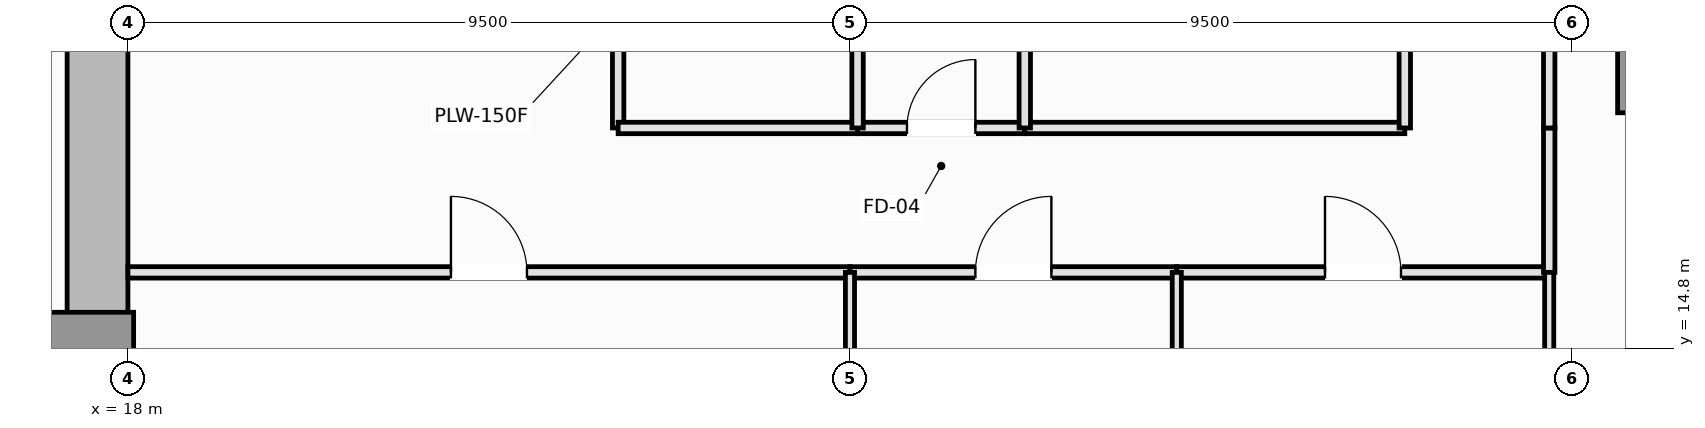
"""IFC4 building model, lengths in metres.
Left out: names, types, materials, properties, quantities, classifications, styles, units other than length and angle.
Written with IfcOpenShell. Run it as: python <this file> out.ifc"""

import sys

from ifc_helpers import new_model, si_unit, direction, frame, frame_2d, origin, origin_2d, place, context, subcontext, project, spatial, rectangle, extrude, element, fill, save


model = new_model("IFC4")
c1 = context("Model", 3, precision=1e-05, world=origin(), true_north=direction((0.0, 1.0)))
c2 = subcontext(c1, "Body", "Model", "MODEL_VIEW")
j1 = project(units=[si_unit("LENGTHUNIT", "METRE"), si_unit("PLANEANGLEUNIT", "RADIAN")], contexts=[c1])
p1 = place(None, origin())
s1 = spatial("IfcSite", under=j1, at=p1, CompositionType="ELEMENT")
p2 = place(p1, origin())
s2 = spatial("IfcBuilding", under=s1, at=p2, CompositionType="ELEMENT")
p3 = place(p2, frame((0.0, 0.0, 75.3)))
s3 = spatial("IfcBuildingStorey", under=s2, at=p3, CompositionType="ELEMENT", Elevation=75.3)
p4 = place(p3, frame((17.6, 14.8, 0.0), z_axis=(0.0, 0.0, 1.0), x_axis=(0.0, 1.0, 0.0)))
e1 = element("IfcWall", 1, at=p4, inside=s3, PredefinedType="SHEAR", context=c2, shape_type="SweptSolid", body=[
    extrude(rectangle(XDim=8.65, YDim=0.8, at=frame_2d((4.325, 0.0))), origin(), (0.0, 0.0, 1.0), 3.55),
])
p5 = place(p4, frame((4.1, 0.0, 0.0)))
e2 = element("IfcOpeningElement", 2, at=p5, cuts=e1, PredefinedType="OPENING", context=c2, shape_type="SweptSolid", body=[
    extrude(rectangle(XDim=1.1, YDim=2.15, at=frame_2d((0.55, 1.075))), frame((0.0, 0.41, 0.0), z_axis=(0.0, -1.0, 0.0), x_axis=(1.0, 0.0, 0.0)), (0.0, 0.0, 1.0), 0.82),
])
p6 = place(p3, frame((17.4, 14.6, 0.0), z_axis=(0.0, 0.0, 1.0), x_axis=(1.0, 0.0, 0.0)))
e3 = element("IfcColumn", 3, at=p6, inside=s3, PredefinedType="PILASTER", context=c2, shape_type="SweptSolid", body=[
    extrude(rectangle(XDim=1.35, YDim=1.35, at=origin_2d()), origin(), (0.0, 0.0, 1.0), 3.55),
])
p7 = place(p3, frame((38.2, 18.5, 0.0), z_axis=(0.0, 0.0, 1.0), x_axis=(1.0, 0.0, 0.0)))
e4 = element("IfcColumn", 4, at=p7, inside=s3, PredefinedType="COLUMN", context=c2, shape_type="SweptSolid", body=[
    extrude(rectangle(XDim=1.2, YDim=1.2, at=origin_2d()), origin(), (0.0, 0.0, 1.0), 3.55),
])
p8 = place(p3, frame((24.45, 17.7, 0.0), z_axis=(0.0, 0.0, 1.0), x_axis=(0.0, 1.0, 0.0)))
e5 = element("IfcWall", 5, at=p8, inside=s3, PredefinedType="PLUMBINGWALL", context=c2, shape_type="SweptSolid", body=[
    extrude(rectangle(XDim=3.1, YDim=0.15, at=frame_2d((1.55, 0.0))), origin(), (0.0, 0.0, 1.0), 3.37),
])
p9 = place(p8, frame((1.1, 0.0, 0.0)))
e6 = element("IfcOpeningElement", 6, at=p9, cuts=e5, PredefinedType="OPENING", context=c2, shape_type="SweptSolid", body=[
    extrude(rectangle(XDim=0.9, YDim=2.1, at=frame_2d((0.45, 1.05))), frame((0.0, 0.085, 0.0), z_axis=(0.0, -1.0, 0.0), x_axis=(1.0, 0.0, 0.0)), (0.0, 0.0, 1.0), 0.17),
])
p10 = place(p3, frame((24.45, 17.7, 0.0), z_axis=(0.0, 0.0, 1.0), x_axis=(1.0, 0.0, 0.0)))
e7 = element("IfcWall", 7, at=p10, inside=s3, PredefinedType="PLUMBINGWALL", context=c2, shape_type="SweptSolid", body=[
    extrude(rectangle(XDim=3.15, YDim=0.15, at=frame_2d((1.575, 0.0))), origin(), (0.0, 0.0, 1.0), 3.37),
])
p11 = place(p3, frame((27.6, 17.7, 0.0), z_axis=(0.0, 0.0, 1.0), x_axis=(1.0, 0.0, 0.0)))
e8 = element("IfcWall", 8, at=p11, inside=s3, PredefinedType="PLUMBINGWALL", context=c2, shape_type="SweptSolid", body=[
    extrude(rectangle(XDim=2.2, YDim=0.15, at=frame_2d((1.1, 0.0))), origin(), (0.0, 0.0, 1.0), 3.37),
])
p12 = place(p11, frame((0.65, 0.0, 0.0)))
e9 = element("IfcOpeningElement", 9, at=p12, cuts=e8, PredefinedType="OPENING", context=c2, shape_type="SweptSolid", body=[
    extrude(rectangle(XDim=0.9, YDim=2.1, at=frame_2d((0.45, 1.05))), frame((0.0, 0.085, 0.0), z_axis=(0.0, -1.0, 0.0), x_axis=(1.0, 0.0, 0.0)), (0.0, 0.0, 1.0), 0.17),
])
p13 = place(p3, frame((29.8, 17.7, 0.0), z_axis=(0.0, 0.0, 1.0), x_axis=(1.0, 0.0, 0.0)))
e10 = element("IfcWall", 10, at=p13, inside=s3, PredefinedType="PARTITIONING", context=c2, shape_type="SweptSolid", body=[
    extrude(rectangle(XDim=5.0, YDim=0.15, at=frame_2d((2.5, 0.0))), origin(), (0.0, 0.0, 1.0), 3.37),
])
p14 = place(p3, frame((18.0, 15.8, 0.0), z_axis=(0.0, 0.0, 1.0), x_axis=(1.0, 0.0, 0.0)))
e11 = element("IfcWall", 11, at=p14, inside=s3, PredefinedType="PARTITIONING", context=c2, shape_type="SweptSolid", body=[
    extrude(rectangle(XDim=9.5, YDim=0.15, at=frame_2d((4.75, 0.0))), origin(), (0.0, 0.0, 1.0), 3.37),
])
p15 = place(p14, frame((4.25, 0.0, 0.0)))
e12 = element("IfcOpeningElement", 12, at=p15, cuts=e11, PredefinedType="OPENING", context=c2, shape_type="SweptSolid", body=[
    extrude(rectangle(XDim=1.0, YDim=2.15, at=frame_2d((0.5, 1.075))), frame((0.0, 0.085, 0.0), z_axis=(0.0, -1.0, 0.0), x_axis=(1.0, 0.0, 0.0)), (0.0, 0.0, 1.0), 0.17),
])
p16 = place(p3, frame((27.5, 15.8, 0.0), z_axis=(0.0, 0.0, 1.0), x_axis=(1.0, 0.0, 0.0)))
e13 = element("IfcWall", 13, at=p16, inside=s3, PredefinedType="PARTITIONING", context=c2, shape_type="SweptSolid", body=[
    extrude(rectangle(XDim=4.3, YDim=0.15, at=frame_2d((2.15, 0.0))), origin(), (0.0, 0.0, 1.0), 3.37),
])
p17 = place(p16, frame((1.65, 0.0, 0.0)))
e14 = element("IfcOpeningElement", 14, at=p17, cuts=e13, PredefinedType="OPENING", context=c2, shape_type="SweptSolid", body=[
    extrude(rectangle(XDim=1.0, YDim=2.15, at=frame_2d((0.5, 1.075))), frame((0.0, 0.085, 0.0), z_axis=(0.0, -1.0, 0.0), x_axis=(1.0, 0.0, 0.0)), (0.0, 0.0, 1.0), 0.17),
])
p18 = place(p3, frame((31.8, 15.8, 0.0), z_axis=(0.0, 0.0, 1.0), x_axis=(1.0, 0.0, 0.0)))
e15 = element("IfcWall", 15, at=p18, inside=s3, PredefinedType="PARTITIONING", context=c2, shape_type="SweptSolid", body=[
    extrude(rectangle(XDim=4.9, YDim=0.15, at=frame_2d((2.45, 0.0))), origin(), (0.0, 0.0, 1.0), 3.37),
])
p19 = place(p18, frame((1.95, 0.0, 0.0)))
e16 = element("IfcOpeningElement", 16, at=p19, cuts=e15, PredefinedType="OPENING", context=c2, shape_type="SweptSolid", body=[
    extrude(rectangle(XDim=1.0, YDim=2.15, at=frame_2d((0.5, 1.075))), frame((0.0, 0.085, 0.0), z_axis=(0.0, -1.0, 0.0), x_axis=(1.0, 0.0, 0.0)), (0.0, 0.0, 1.0), 0.17),
])
p20 = place(p3, frame((36.7, 15.8, 0.0), z_axis=(0.0, 0.0, 1.0), x_axis=(0.0, 1.0, 0.0)))
e17 = element("IfcWall", 17, at=p20, inside=s3, PredefinedType="PARTITIONING", context=c2, shape_type="SweptSolid", body=[
    extrude(rectangle(XDim=1.9, YDim=0.15, at=frame_2d((0.95, 0.0))), origin(), (0.0, 0.0, 1.0), 3.37),
])
p21 = place(p3, frame((34.8, 17.7, 0.0), z_axis=(0.0, 0.0, 1.0), x_axis=(0.0, 1.0, 0.0)))
e18 = element("IfcWall", 18, at=p21, inside=s3, PredefinedType="PARTITIONING", context=c2, shape_type="SweptSolid", body=[
    extrude(rectangle(XDim=3.1, YDim=0.15, at=frame_2d((1.55, 0.0))), origin(), (0.0, 0.0, 1.0), 3.37),
])
p22 = place(p21, frame((1.05, 0.0, 0.0)))
e19 = element("IfcOpeningElement", 19, at=p22, cuts=e18, PredefinedType="OPENING", context=c2, shape_type="SweptSolid", body=[
    extrude(rectangle(XDim=1.0, YDim=2.15, at=frame_2d((0.5, 1.075))), frame((0.0, 0.085, 0.0), z_axis=(0.0, -1.0, 0.0), x_axis=(1.0, 0.0, 0.0)), (0.0, 0.0, 1.0), 0.17),
])
p23 = place(p3, frame((36.7, 17.7, 0.0), z_axis=(0.0, 0.0, 1.0), x_axis=(0.0, 1.0, 0.0)))
e20 = element("IfcWall", 20, at=p23, inside=s3, PredefinedType="PARTITIONING", context=c2, shape_type="SweptSolid", body=[
    extrude(rectangle(XDim=14.3, YDim=0.15, at=frame_2d((7.15, 0.0))), origin(), (0.0, 0.0, 1.0), 3.37),
])
p24 = place(p23, frame((5.683, 0.0, 0.0)))
e21 = element("IfcOpeningElement", 21, at=p24, cuts=e20, PredefinedType="OPENING", context=c2, shape_type="SweptSolid", body=[
    extrude(rectangle(XDim=1.0, YDim=2.15, at=frame_2d((0.5, 1.075))), frame((0.0, 0.085, 0.0), z_axis=(0.0, -1.0, 0.0), x_axis=(1.0, 0.0, 0.0)), (0.0, 0.0, 1.0), 0.17),
])
for number, where, z_axis, x_axis in (
    (22, (27.6, 17.7, 0.0), (0.0, 0.0, 1.0), (0.0, 1.0, 0.0)),
    (23, (29.8, 17.7, 0.0), (0.0, 0.0, 1.0), (0.0, 1.0, 0.0)),
):
    element("IfcWall", number, at=place(p3, frame(where, z_axis=z_axis, x_axis=x_axis)), inside=s3, PredefinedType="PLUMBINGWALL", context=c2, shape_type="SweptSolid", body=[
        extrude(rectangle(XDim=3.1, YDim=0.15, at=frame_2d((1.55, 0.0))), origin(), (0.0, 0.0, 1.0), 3.37),
    ])
p25 = place(p3, frame((27.5, 2.51, 0.0), z_axis=(0.0, 0.0, 1.0), x_axis=(0.0, 1.0, 0.0)))
e24 = element("IfcWall", 24, at=p25, inside=s3, PredefinedType="PARTITIONING", context=c2, shape_type="SweptSolid", body=[
    extrude(rectangle(XDim=13.29, YDim=0.12, at=frame_2d((6.645, 0.0))), origin(), (0.0, 0.0, 1.0), 2.82),
])
for number, where, z_axis, x_axis in (
    (25, (31.8, 2.51, 0.0), (0.0, 0.0, 1.0), (0.0, 1.0, 0.0)),
    (26, (36.7, 2.51, 0.0), (0.0, 0.0, 1.0), (0.0, 1.0, 0.0)),
):
    element("IfcWall", number, at=place(p3, frame(where, z_axis=z_axis, x_axis=x_axis)), inside=s3, PredefinedType="PARTITIONING", context=c2, shape_type="SweptSolid", body=[
        extrude(rectangle(XDim=13.29, YDim=0.12, at=frame_2d((6.645, 0.0))), origin(), (0.0, 0.0, 1.0), 3.37),
    ])
p26 = place(p12, origin())
e27 = element("IfcDoor", 27, at=p26, inside=s3, OperationType="SINGLE_SWING_RIGHT", PredefinedType="DOOR", context=c2, shape_type="SweptSolid", body=[
    extrude(rectangle(XDim=0.9, YDim=2.1, at=frame_2d((0.45, 1.05))), frame((0.0, 0.025, 0.0), z_axis=(0.0, -1.0, 0.0), x_axis=(1.0, 0.0, 0.0)), (0.0, 0.0, 1.0), 0.05),
])
fill(e9, e27)
p27 = place(p15, origin())
e28 = element("IfcDoor", 28, at=p27, inside=s3, OperationType="SINGLE_SWING_LEFT", PredefinedType="DOOR", context=c2, shape_type="SweptSolid", body=[
    extrude(rectangle(XDim=1.0, YDim=2.15, at=frame_2d((0.5, 1.075))), frame((0.0, 0.025, 0.0), z_axis=(0.0, -1.0, 0.0), x_axis=(1.0, 0.0, 0.0)), (0.0, 0.0, 1.0), 0.05),
])
fill(e12, e28)
p28 = place(p17, origin())
e29 = element("IfcDoor", 29, at=p28, inside=s3, OperationType="SINGLE_SWING_RIGHT", PredefinedType="DOOR", context=c2, shape_type="SweptSolid", body=[
    extrude(rectangle(XDim=1.0, YDim=2.15, at=frame_2d((0.5, 1.075))), frame((0.0, 0.025, 0.0), z_axis=(0.0, -1.0, 0.0), x_axis=(1.0, 0.0, 0.0)), (0.0, 0.0, 1.0), 0.05),
])
fill(e14, e29)
p29 = place(p19, origin())
e30 = element("IfcDoor", 30, at=p29, inside=s3, OperationType="SINGLE_SWING_LEFT", PredefinedType="DOOR", context=c2, shape_type="SweptSolid", body=[
    extrude(rectangle(XDim=1.0, YDim=2.15, at=frame_2d((0.5, 1.075))), frame((0.0, 0.025, 0.0), z_axis=(0.0, -1.0, 0.0), x_axis=(1.0, 0.0, 0.0)), (0.0, 0.0, 1.0), 0.05),
])
fill(e16, e30)
save(model, sys.argv[1])
